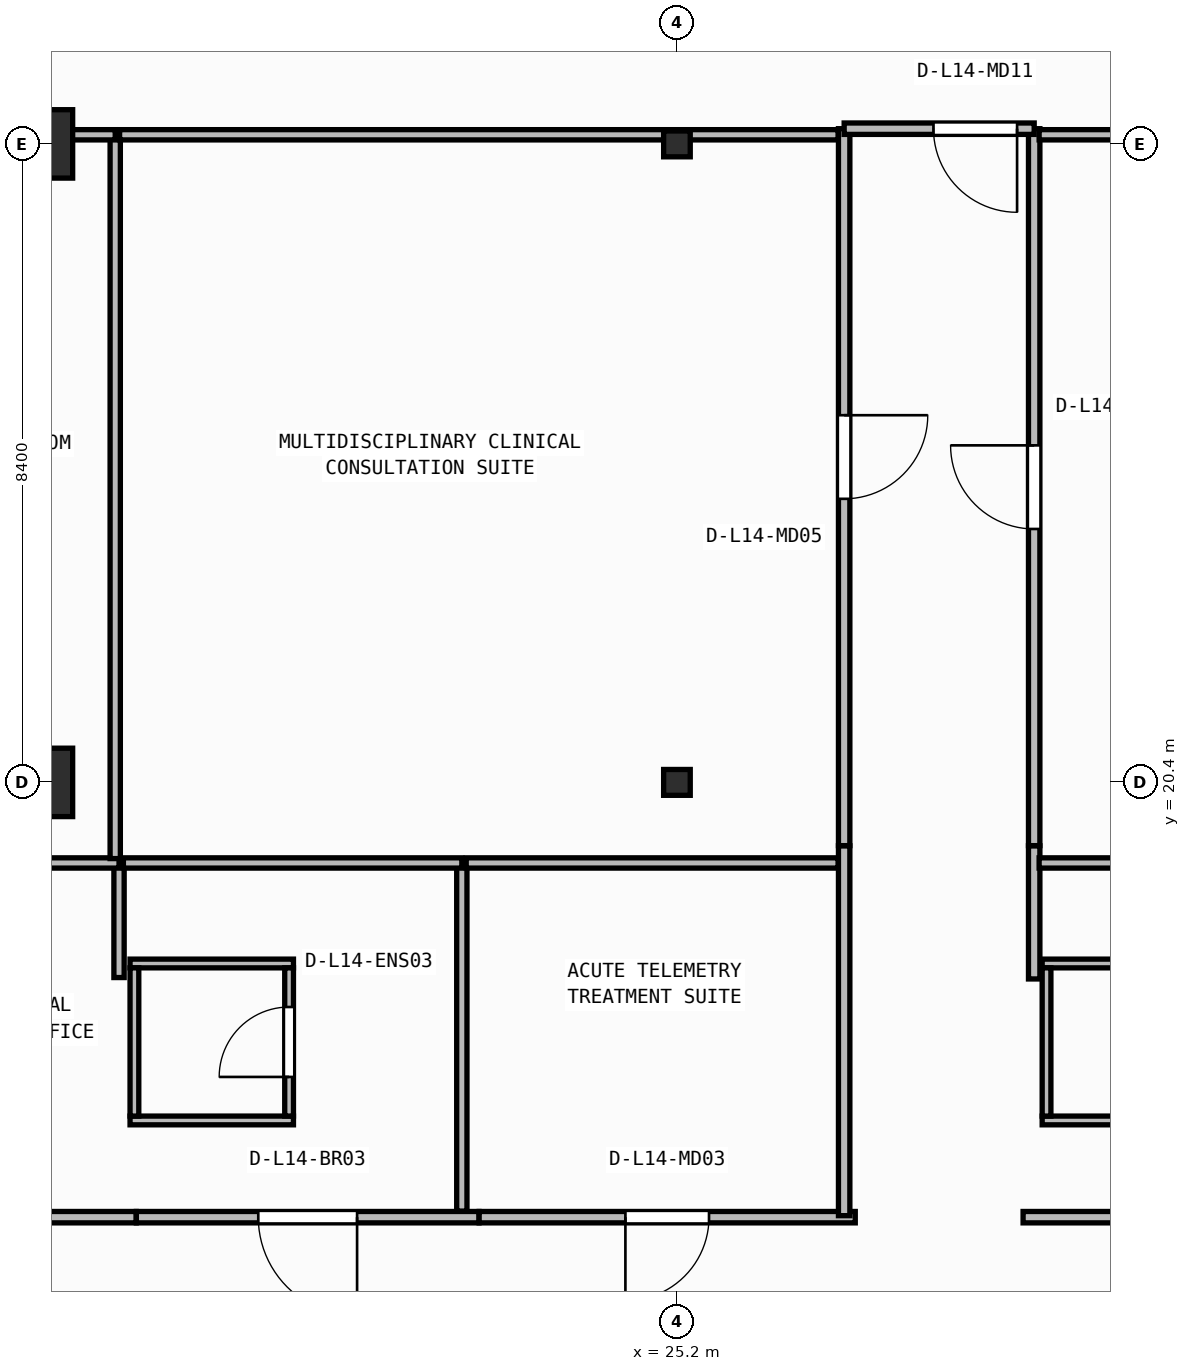
"""IFC4 building model, lengths in metres.
Left out: names, types, materials, properties, quantities, classifications, styles, units other than length and angle.
Written with IfcOpenShell. Run it as: python <this file> out.ifc"""

import sys

from ifc_helpers import new_model, si_unit, direction, frame, frame_2d, origin, origin_2d, place, context, subcontext, project, spatial, rectangle, i_section, extrude, element, fill, save


model = new_model("IFC4")
c1 = context("Model", 3, precision=1e-05, world=origin(), true_north=direction((0.0, 1.0)))
c2 = subcontext(c1, "Body", "Model", "MODEL_VIEW")
j1 = project(units=[si_unit("LENGTHUNIT", "METRE"), si_unit("PLANEANGLEUNIT", "RADIAN")], contexts=[c1])
p1 = place(None, origin())
s1 = spatial("IfcSite", under=j1, at=p1, CompositionType="ELEMENT")
p2 = place(p1, origin())
s2 = spatial("IfcBuilding", under=s1, at=p2, CompositionType="ELEMENT")
p3 = place(p2, frame((0.0, 0.0, 58.05)))
s3 = spatial("IfcBuildingStorey", under=s2, at=p3, CompositionType="ELEMENT", Elevation=58.05)
p4 = place(p3, frame((16.8, 20.4, 0.0), z_axis=(0.0, 0.0, 1.0), x_axis=(1.0, 0.0, 0.0)))
e1 = element("IfcColumn", 1, at=p4, inside=s3, PredefinedType="COLUMN", context=c2, shape_type="SweptSolid", body=[
    extrude(rectangle(XDim=0.9, YDim=0.9, at=origin_2d()), origin(), (0.0, 0.0, 1.0), 3.95),
])
p5 = place(p3, frame((25.2, 20.4, 0.0), z_axis=(0.0, 0.0, 1.0), x_axis=(1.0, 0.0, 0.0)))
e2 = element("IfcColumn", 2, at=p5, inside=s3, PredefinedType="COLUMN", context=c2, shape_type="SweptSolid", body=[
    extrude(i_section(OverallWidth=0.35, OverallDepth=0.34, WebThickness=0.016, FlangeThickness=0.028, at=origin_2d()), origin(), (0.0, 0.0, 1.0), 3.95),
])
p6 = place(p3, frame((16.8, 28.8, 0.0), z_axis=(0.0, 0.0, 1.0), x_axis=(1.0, 0.0, 0.0)))
e3 = element("IfcColumn", 3, at=p6, inside=s3, PredefinedType="COLUMN", context=c2, shape_type="SweptSolid", body=[
    extrude(rectangle(XDim=0.9, YDim=0.9, at=origin_2d()), origin(), (0.0, 0.0, 1.0), 3.95),
])
p7 = place(p3, frame((25.2, 28.8, 0.0), z_axis=(0.0, 0.0, 1.0), x_axis=(1.0, 0.0, 0.0)))
e4 = element("IfcColumn", 4, at=p7, inside=s3, PredefinedType="COLUMN", context=c2, shape_type="SweptSolid", body=[
    extrude(i_section(OverallWidth=0.35, OverallDepth=0.34, WebThickness=0.016, FlangeThickness=0.028, at=origin_2d()), origin(), (0.0, 0.0, 1.0), 3.95),
])
for number, where, z_axis, x_axis in (
    (5, (18.005, 15.952, 0.0), (0.0, 0.0, 1.0), (1.0, 0.0, 0.0)),
    (6, (18.005, 18.018, 0.0), (0.0, 0.0, 1.0), (1.0, 0.0, 0.0)),
):
    element("IfcWall", number, at=place(p3, frame(where, z_axis=z_axis, x_axis=x_axis)), inside=s3, PredefinedType="PARTITIONING", context=c2, shape_type="SweptSolid", body=[
        extrude(rectangle(XDim=2.15, YDim=0.115, at=frame_2d((1.075, 0.0))), origin(), (0.0, 0.0, 1.0), 3.71),
    ])
p8 = place(p3, frame((18.062, 16.01, 0.0), z_axis=(0.0, 0.0, 1.0), x_axis=(0.0, 1.0, 0.0)))
e7 = element("IfcWall", 7, at=p8, inside=s3, PredefinedType="PARTITIONING", context=c2, shape_type="SweptSolid", body=[
    extrude(rectangle(XDim=1.95, YDim=0.115, at=frame_2d((0.975, 0.0))), origin(), (0.0, 0.0, 1.0), 3.71),
])
p9 = place(p3, frame((20.097, 16.01, 0.0), z_axis=(0.0, 0.0, 1.0), x_axis=(0.0, 1.0, 0.0)))
e8 = element("IfcWall", 8, at=p9, inside=s3, PredefinedType="PARTITIONING", context=c2, shape_type="SweptSolid", body=[
    extrude(rectangle(XDim=1.95, YDim=0.115, at=frame_2d((0.975, 0.0))), origin(), (0.0, 0.0, 1.0), 3.71),
])
p10 = place(p9, frame((0.515, 0.0, 0.0)))
e9 = element("IfcOpeningElement", 9, at=p10, cuts=e8, PredefinedType="OPENING", context=c2, shape_type="SweptSolid", body=[
    extrude(rectangle(XDim=0.92, YDim=2.1, at=frame_2d((0.46, 1.05))), frame((0.0, 0.067, 0.0), z_axis=(0.0, -1.0, 0.0), x_axis=(1.0, 0.0, 0.0)), (0.0, 0.0, 1.0), 0.135),
])
p11 = place(p3, frame((30.005, 15.952, 0.0), z_axis=(0.0, 0.0, 1.0), x_axis=(1.0, 0.0, 0.0)))
e10 = element("IfcWall", 10, at=p11, inside=s3, PredefinedType="PARTITIONING", context=c2, shape_type="SweptSolid", body=[
    extrude(rectangle(XDim=2.15, YDim=0.115, at=frame_2d((1.075, 0.0))), origin(), (0.0, 0.0, 1.0), 3.429),
])
p12 = place(p3, frame((30.005, 18.018, 0.0), z_axis=(0.0, 0.0, 1.0), x_axis=(1.0, 0.0, 0.0)))
e11 = element("IfcWall", 11, at=p12, inside=s3, PredefinedType="PARTITIONING", context=c2, shape_type="SweptSolid", body=[
    extrude(rectangle(XDim=2.15, YDim=0.115, at=frame_2d((1.075, 0.0))), origin(), (0.0, 0.0, 1.0), 3.71),
])
p13 = place(p3, frame((30.062, 16.01, 0.0), z_axis=(0.0, 0.0, 1.0), x_axis=(0.0, 1.0, 0.0)))
e12 = element("IfcWall", 12, at=p13, inside=s3, PredefinedType="PARTITIONING", context=c2, shape_type="SweptSolid", body=[
    extrude(rectangle(XDim=1.95, YDim=0.115, at=frame_2d((0.975, 0.0))), origin(), (0.0, 0.0, 1.0), 3.71),
])
p14 = place(p3, frame((18.086, 14.68, 0.0), z_axis=(0.0, 0.0, 1.0), x_axis=(-1.0, 0.0, 0.0)))
e13 = element("IfcWall", 13, at=p14, inside=s3, PredefinedType="PARTITIONING", context=c2, shape_type="SweptSolid", body=[
    extrude(rectangle(XDim=4.148, YDim=0.15, at=frame_2d((2.074, 0.0))), origin(), (0.0, 0.0, 1.0), 3.71),
])
p15 = place(p14, frame((1.524, 0.0, 0.0)))
e14 = element("IfcOpeningElement", 14, at=p15, cuts=e13, PredefinedType="OPENING", context=c2, shape_type="SweptSolid", body=[
    extrude(rectangle(XDim=1.1, YDim=2.1, at=frame_2d((0.55, 1.05))), frame((0.0, 0.085, 0.0), z_axis=(0.0, -1.0, 0.0), x_axis=(1.0, 0.0, 0.0)), (0.0, 0.0, 1.0), 0.17),
])
p16 = place(p3, frame((22.596, 14.68, 0.0), z_axis=(0.0, 0.0, 1.0), x_axis=(-1.0, 0.0, 0.0)))
e15 = element("IfcWall", 15, at=p16, inside=s3, PredefinedType="PARTITIONING", context=c2, shape_type="SweptSolid", body=[
    extrude(rectangle(XDim=4.508, YDim=0.15, at=frame_2d((2.254, 0.0))), origin(), (0.0, 0.0, 1.0), 3.71),
])
p17 = place(p16, frame((1.604, 0.0, 0.0)))
e16 = element("IfcOpeningElement", 16, at=p17, cuts=e15, PredefinedType="OPENING", context=c2, shape_type="SweptSolid", body=[
    extrude(rectangle(XDim=1.3, YDim=2.15, at=frame_2d((0.65, 1.075))), frame((0.0, 0.085, 0.0), z_axis=(0.0, -1.0, 0.0), x_axis=(1.0, 0.0, 0.0)), (0.0, 0.0, 1.0), 0.17),
])
p18 = place(p3, frame((27.546, 14.68, 0.0), z_axis=(0.0, 0.0, 1.0), x_axis=(-1.0, 0.0, 0.0)))
e17 = element("IfcWall", 17, at=p18, inside=s3, PredefinedType="PARTITIONING", context=c2, shape_type="SweptSolid", body=[
    extrude(rectangle(XDim=4.948, YDim=0.15, at=frame_2d((2.474, 0.0))), origin(), (0.0, 0.0, 1.0), 3.71),
])
p19 = place(p18, frame((1.924, 0.0, 0.0)))
e18 = element("IfcOpeningElement", 18, at=p19, cuts=e17, PredefinedType="OPENING", context=c2, shape_type="SweptSolid", body=[
    extrude(rectangle(XDim=1.1, YDim=2.1, at=frame_2d((0.55, 1.05))), frame((0.0, 0.085, 0.0), z_axis=(0.0, -1.0, 0.0), x_axis=(1.0, 0.0, 0.0)), (0.0, 0.0, 1.0), 0.17),
])
p20 = place(p3, frame((34.806, 14.68, 0.0), z_axis=(0.0, 0.0, 1.0), x_axis=(-1.0, 0.0, 0.0)))
e19 = element("IfcWall", 19, at=p20, inside=s3, PredefinedType="PARTITIONING", context=c2, shape_type="SweptSolid", body=[
    extrude(rectangle(XDim=5.052, YDim=0.15, at=frame_2d((2.526, 0.0))), origin(), (0.0, 0.0, 1.0), 3.71),
])
p21 = place(p20, frame((1.876, 0.0, 0.0)))
e20 = element("IfcOpeningElement", 20, at=p21, cuts=e19, PredefinedType="OPENING", context=c2, shape_type="SweptSolid", body=[
    extrude(rectangle(XDim=1.3, YDim=2.15, at=frame_2d((0.65, 1.075))), frame((0.0, 0.085, 0.0), z_axis=(0.0, -1.0, 0.0), x_axis=(1.0, 0.0, 0.0)), (0.0, 0.0, 1.0), 0.17),
])
p22 = place(p3, frame((27.4, 19.566, 0.0), z_axis=(0.0, 0.0, 1.0), x_axis=(0.0, -1.0, 0.0)))
e21 = element("IfcWall", 21, at=p22, inside=s3, PredefinedType="PARTITIONING", context=c2, shape_type="SweptSolid", body=[
    extrude(rectangle(XDim=4.866, YDim=0.15, at=frame_2d((2.433, 0.0))), origin(), (0.0, 0.0, 1.0), 3.71),
])
p23 = place(p3, frame((27.4, 29.0, 0.0), z_axis=(0.0, 0.0, 1.0), x_axis=(0.0, -1.0, 0.0)))
e22 = element("IfcWall", 22, at=p23, inside=s3, PredefinedType="PARTITIONING", context=c2, shape_type="SweptSolid", body=[
    extrude(rectangle(XDim=9.432, YDim=0.15, at=frame_2d((4.716, 0.0))), origin(), (0.0, 0.0, 1.0), 3.71),
])
p24 = place(p23, frame((3.769, 0.0, 0.0)))
e23 = element("IfcOpeningElement", 23, at=p24, cuts=e22, PredefinedType="OPENING", context=c2, shape_type="SweptSolid", body=[
    extrude(rectangle(XDim=1.1, YDim=2.1, at=frame_2d((0.55, 1.05))), frame((0.0, 0.085, 0.0), z_axis=(0.0, -1.0, 0.0), x_axis=(1.0, 0.0, 0.0)), (0.0, 0.0, 1.0), 0.17),
])
p25 = place(p3, frame((29.9, 17.814, 0.0), z_axis=(0.0, 0.0, 1.0), x_axis=(0.0, 1.0, 0.0)))
e24 = element("IfcWall", 24, at=p25, inside=s3, PredefinedType="PARTITIONING", context=c2, shape_type="SweptSolid", body=[
    extrude(rectangle(XDim=1.752, YDim=0.15, at=frame_2d((0.876, 0.0))), origin(), (0.0, 0.0, 1.0), 3.71),
])
p26 = place(p3, frame((29.9, 19.568, 0.0), z_axis=(0.0, 0.0, 1.0), x_axis=(0.0, 1.0, 0.0)))
e25 = element("IfcWall", 25, at=p26, inside=s3, PredefinedType="PARTITIONING", context=c2, shape_type="SweptSolid", body=[
    extrude(rectangle(XDim=9.432, YDim=0.15, at=frame_2d((4.716, 0.0))), origin(), (0.0, 0.0, 1.0), 3.71),
])
p27 = place(p26, frame((4.166, 0.0, 0.0)))
e26 = element("IfcOpeningElement", 26, at=p27, cuts=e25, PredefinedType="OPENING", context=c2, shape_type="SweptSolid", body=[
    extrude(rectangle(XDim=1.1, YDim=2.1, at=frame_2d((0.55, 1.05))), frame((0.0, 0.085, 0.0), z_axis=(0.0, -1.0, 0.0), x_axis=(1.0, 0.0, 0.0)), (0.0, 0.0, 1.0), 0.17),
])
p28 = place(p3, frame((29.9, 29.0, 0.0), z_axis=(0.0, 0.0, 1.0), x_axis=(-1.0, 0.0, 0.0)))
e27 = element("IfcWall", 27, at=p28, inside=s3, PredefinedType="PARTITIONING", context=c2, shape_type="SweptSolid", body=[
    extrude(rectangle(XDim=2.5, YDim=0.15, at=frame_2d((1.25, 0.0))), origin(), (0.0, 0.0, 1.0), 3.279),
])
p29 = place(p28, frame((0.225, 0.0, 0.0)))
e28 = element("IfcOpeningElement", 28, at=p29, cuts=e27, PredefinedType="OPENING", context=c2, shape_type="SweptSolid", body=[
    extrude(rectangle(XDim=1.1, YDim=2.1, at=frame_2d((0.55, 1.05))), frame((0.0, 0.085, 0.0), z_axis=(0.0, -1.0, 0.0), x_axis=(1.0, 0.0, 0.0)), (0.0, 0.0, 1.0), 0.17),
])
p30 = place(p3, frame((17.86, 17.833, 0.0), z_axis=(0.0, 0.0, 1.0), x_axis=(0.0, 1.0, 0.0)))
e29 = element("IfcWall", 29, at=p30, inside=s3, PredefinedType="PARTITIONING", context=c2, shape_type="SweptSolid", body=[
    extrude(rectangle(XDim=1.508, YDim=0.135, at=frame_2d((0.754, 0.0))), origin(), (0.0, 0.0, 1.0), 3.71),
])
p31 = place(p3, frame((17.86, 19.34, 0.0), z_axis=(0.0, 0.0, 1.0), x_axis=(-1.0, 0.0, 0.0)))
e30 = element("IfcWall", 30, at=p31, inside=s3, PredefinedType="PARTITIONING", context=c2, shape_type="SweptSolid", body=[
    extrude(rectangle(XDim=4.093, YDim=0.135, at=frame_2d((2.046, 0.0))), origin(), (0.0, 0.0, 1.0), 3.71),
])
p32 = place(p31, frame((2.728, 0.0, 0.0)))
e31 = element("IfcOpeningElement", 31, at=p32, cuts=e30, PredefinedType="OPENING", context=c2, shape_type="SweptSolid", body=[
    extrude(rectangle(XDim=1.1, YDim=2.1, at=frame_2d((0.55, 1.05))), frame((0.0, 0.077, 0.0), z_axis=(0.0, -1.0, 0.0), x_axis=(1.0, 0.0, 0.0)), (0.0, 0.0, 1.0), 0.155),
])
p33 = place(p3, frame((22.37, 14.76, 0.0), z_axis=(0.0, 0.0, 1.0), x_axis=(0.0, 1.0, 0.0)))
e32 = element("IfcWall", 32, at=p33, inside=s3, PredefinedType="PARTITIONING", context=c2, shape_type="SweptSolid", body=[
    extrude(rectangle(XDim=4.58, YDim=0.135, at=frame_2d((2.29, 0.0))), origin(), (0.0, 0.0, 1.0), 3.71),
])
p34 = place(p3, frame((22.37, 19.34, 0.0), z_axis=(0.0, 0.0, 1.0), x_axis=(-1.0, 0.0, 0.0)))
e33 = element("IfcWall", 33, at=p34, inside=s3, PredefinedType="PARTITIONING", context=c2, shape_type="SweptSolid", body=[
    extrude(rectangle(XDim=4.453, YDim=0.135, at=frame_2d((2.226, 0.0))), origin(), (0.0, 0.0, 1.0), 3.71),
])
p35 = place(p3, frame((27.32, 19.34, 0.0), z_axis=(0.0, 0.0, 1.0), x_axis=(-1.0, 0.0, 0.0)))
e34 = element("IfcWall", 34, at=p35, inside=s3, PredefinedType="PARTITIONING", context=c2, shape_type="SweptSolid", body=[
    extrude(rectangle(XDim=4.893, YDim=0.135, at=frame_2d((2.446, 0.0))), origin(), (0.0, 0.0, 1.0), 3.71),
])
p36 = place(p3, frame((17.81, 19.397, 0.0), z_axis=(0.0, 0.0, 1.0), x_axis=(0.0, 1.0, 0.0)))
e35 = element("IfcWall", 35, at=p36, inside=s3, PredefinedType="PARTITIONING", context=c2, shape_type="SweptSolid", body=[
    extrude(rectangle(XDim=9.522, YDim=0.135, at=frame_2d((4.761, 0.0))), origin(), (0.0, 0.0, 1.0), 3.71),
])
p37 = place(p3, frame((17.81, 28.92, 0.0), z_axis=(0.0, 0.0, 1.0), x_axis=(-1.0, 0.0, 0.0)))
e36 = element("IfcWall", 36, at=p37, inside=s3, PredefinedType="PARTITIONING", context=c2, shape_type="SweptSolid", body=[
    extrude(rectangle(XDim=3.243, YDim=0.135, at=frame_2d((1.622, 0.0))), origin(), (0.0, 0.0, 1.0), 3.073),
])
p38 = place(p3, frame((27.32, 28.92, 0.0), z_axis=(0.0, 0.0, 1.0), x_axis=(-1.0, 0.0, 0.0)))
e37 = element("IfcWall", 37, at=p38, inside=s3, PredefinedType="PARTITIONING", context=c2, shape_type="SweptSolid", body=[
    extrude(rectangle(XDim=9.453, YDim=0.135, at=frame_2d((4.726, 0.0))), origin(), (0.0, 0.0, 1.0), 3.073),
])
p39 = place(p3, frame((34.58, 19.34, 0.0), z_axis=(0.0, 0.0, 1.0), x_axis=(-1.0, 0.0, 0.0)))
e38 = element("IfcWall", 38, at=p39, inside=s3, PredefinedType="PARTITIONING", context=c2, shape_type="SweptSolid", body=[
    extrude(rectangle(XDim=4.615, YDim=0.135, at=frame_2d((2.308, 0.0))), origin(), (0.0, 0.0, 1.0), 3.71),
])
p40 = place(p3, frame((33.15, 28.92, 0.0), z_axis=(0.0, 0.0, 1.0), x_axis=(-1.0, 0.0, 0.0)))
e39 = element("IfcWall", 39, at=p40, inside=s3, PredefinedType="PARTITIONING", context=c2, shape_type="SweptSolid", body=[
    extrude(rectangle(XDim=3.185, YDim=0.135, at=frame_2d((1.592, 0.0))), origin(), (0.0, 0.0, 1.0), 3.279),
])
p41 = place(p10, origin())
e40 = element("IfcDoor", 40, at=p41, inside=s3, OperationType="SINGLE_SWING_LEFT", PredefinedType="DOOR", context=c2, shape_type="SweptSolid", body=[
    extrude(rectangle(XDim=0.92, YDim=2.1, at=frame_2d((0.46, 1.05))), frame((0.0, 0.025, 0.0), z_axis=(0.0, -1.0, 0.0), x_axis=(1.0, 0.0, 0.0)), (0.0, 0.0, 1.0), 0.05),
])
fill(e9, e40)
p42 = place(p17, origin())
e41 = element("IfcDoor", 41, at=p42, inside=s3, OperationType="SINGLE_SWING_LEFT", PredefinedType="DOOR", context=c2, shape_type="SweptSolid", body=[
    extrude(rectangle(XDim=1.3, YDim=2.15, at=frame_2d((0.65, 1.075))), frame((0.0, 0.025, 0.0), z_axis=(0.0, -1.0, 0.0), x_axis=(1.0, 0.0, 0.0)), (0.0, 0.0, 1.0), 0.05),
])
fill(e16, e41)
p43 = place(p19, origin())
e42 = element("IfcDoor", 42, at=p43, inside=s3, OperationType="SINGLE_SWING_RIGHT", PredefinedType="DOOR", context=c2, shape_type="SweptSolid", body=[
    extrude(rectangle(XDim=1.1, YDim=2.1, at=frame_2d((0.55, 1.05))), frame((0.0, 0.025, 0.0), z_axis=(0.0, -1.0, 0.0), x_axis=(1.0, 0.0, 0.0)), (0.0, 0.0, 1.0), 0.05),
])
fill(e18, e42)
p44 = place(p24, origin())
e43 = element("IfcDoor", 43, at=p44, inside=s3, OperationType="SINGLE_SWING_LEFT", PredefinedType="DOOR", context=c2, shape_type="SweptSolid", body=[
    extrude(rectangle(XDim=1.1, YDim=2.1, at=frame_2d((0.55, 1.05))), frame((0.0, 0.025, 0.0), z_axis=(0.0, -1.0, 0.0), x_axis=(1.0, 0.0, 0.0)), (0.0, 0.0, 1.0), 0.05),
])
fill(e23, e43)
p45 = place(p27, origin())
e44 = element("IfcDoor", 44, at=p45, inside=s3, OperationType="SINGLE_SWING_RIGHT", PredefinedType="DOOR", context=c2, shape_type="SweptSolid", body=[
    extrude(rectangle(XDim=1.1, YDim=2.1, at=frame_2d((0.55, 1.05))), frame((0.0, 0.025, 0.0), z_axis=(0.0, -1.0, 0.0), x_axis=(1.0, 0.0, 0.0)), (0.0, 0.0, 1.0), 0.05),
])
fill(e26, e44)
p46 = place(p29, origin())
e45 = element("IfcDoor", 45, at=p46, inside=s3, OperationType="SINGLE_SWING_LEFT", PredefinedType="DOOR", context=c2, shape_type="SweptSolid", body=[
    extrude(rectangle(XDim=1.1, YDim=2.1, at=frame_2d((0.55, 1.05))), frame((0.0, 0.025, 0.0), z_axis=(0.0, -1.0, 0.0), x_axis=(1.0, 0.0, 0.0)), (0.0, 0.0, 1.0), 0.05),
])
fill(e28, e45)
save(model, sys.argv[1])
